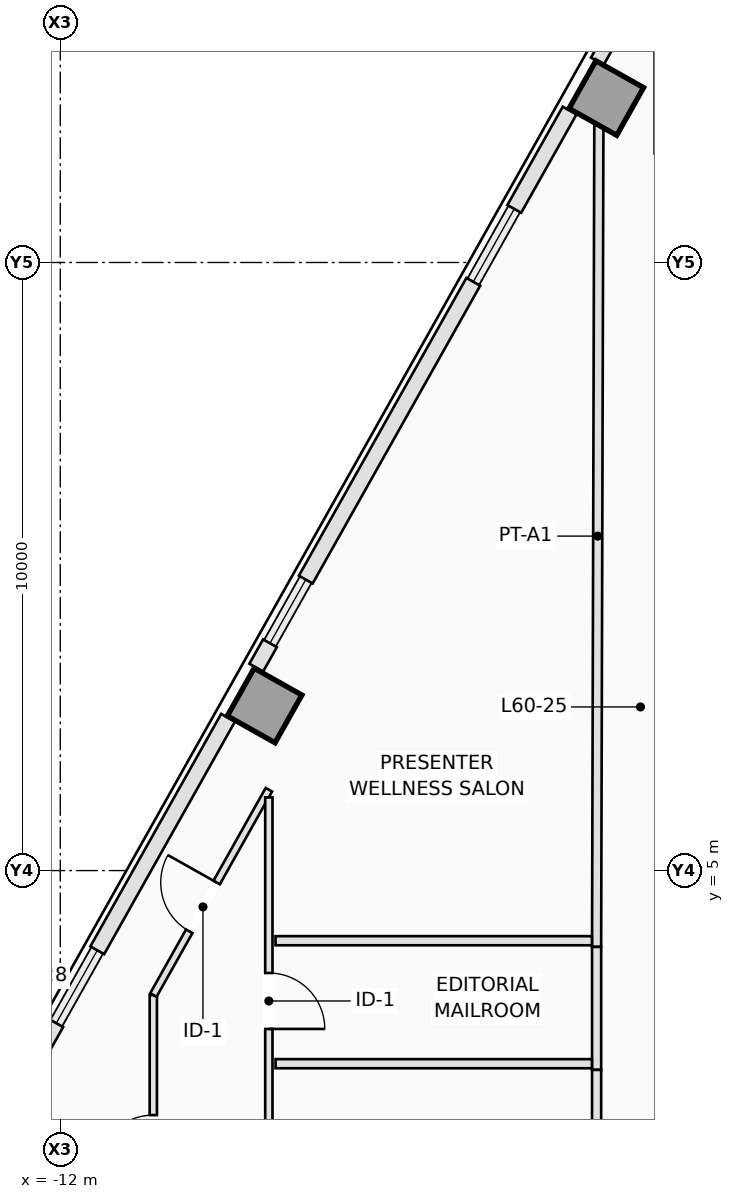
"""IFC4 building model, lengths in metres.
Left out: names, types, materials, properties, quantities, classifications, styles, units other than length and angle.
Written with IfcOpenShell. Run it as: python <this file> out.ifc"""

import sys

from ifc_helpers import new_model, si_unit, direction, frame, frame_2d, origin, origin_2d, place, context, subcontext, project, spatial, rectangle, extrude, element, fill, save


model = new_model("IFC4")
c1 = context("Model", 3, precision=1e-05, world=origin(), true_north=direction((0.0, 1.0)))
c2 = subcontext(c1, "Body", "Model", "MODEL_VIEW")
j1 = project(units=[si_unit("LENGTHUNIT", "METRE"), si_unit("PLANEANGLEUNIT", "RADIAN")], contexts=[c1])
p1 = place(None, origin())
s1 = spatial("IfcSite", under=j1, at=p1, CompositionType="ELEMENT")
p2 = place(p1, origin())
s2 = spatial("IfcBuilding", under=s1, at=p2, CompositionType="ELEMENT")
p3 = place(p2, frame((0.0, 0.0, 218.4)))
s3 = spatial("IfcBuildingStorey", under=s2, at=p3, CompositionType="ELEMENT", Elevation=218.4)
for number, where, z_axis, x_axis in (
    (1, (-3.021, 17.704, 0.0), (0.0, 0.0, 1.0), (-0.872, 0.49, 0.0)),
    (2, (-8.64, 7.715, 0.0), (0.0, 0.0, 1.0), (-0.872, 0.49, 0.0)),
):
    element("IfcColumn", number, at=place(p3, frame(where, z_axis=z_axis, x_axis=x_axis)), inside=s3, PredefinedType="COLUMN", context=c2, shape_type="SweptSolid", body=[
        extrude(rectangle(XDim=0.9, YDim=0.9, at=origin_2d()), origin(), (0.0, 0.0, 1.0), 3.5),
    ])
p4 = place(p3, frame((-3.168, 18.309, 0.0), z_axis=(0.0, 0.0, 1.0), x_axis=(0.490345412687, 0.87152818443, 0.0)))
e3 = element("IfcWall", 3, at=p4, inside=s3, PredefinedType="STANDARD", context=c2, shape_type="SweptSolid", body=[
    extrude(rectangle(XDim=0.964, YDim=0.24, at=frame_2d((0.482, 0.0))), origin(), (0.0, 0.0, 1.0), 3.25),
])
p5 = place(p3, frame((-8.777, 8.337, 0.0), z_axis=(0.0, 0.0, 1.0), x_axis=(0.490412424957, 0.871490478116, 0.0)))
e4 = element("IfcWall", 4, at=p5, inside=s3, PredefinedType="STANDARD", context=c2, shape_type="SweptSolid", body=[
    extrude(rectangle(XDim=0.46, YDim=0.26, at=frame_2d((0.23, 0.0))), origin(), (0.0, 0.0, 1.0), 3.25),
])
p6 = place(p3, frame((-7.962, 9.785, 0.0), z_axis=(0.0, 0.0, 1.0), x_axis=(0.490240608828, 0.871587141631, 0.0)))
e5 = element("IfcWall", 5, at=p6, inside=s3, PredefinedType="STANDARD", context=c2, shape_type="SweptSolid", body=[
    extrude(rectangle(XDim=5.618, YDim=0.26, at=frame_2d((2.809, 0.0))), origin(), (0.0, 0.0, 1.0), 3.25),
])
p7 = place(p3, frame((-4.533, 15.882, 0.0), z_axis=(0.0, 0.0, 1.0), x_axis=(0.490261239633, 0.871575537125, 0.0)))
e6 = element("IfcWall", 6, at=p7, inside=s3, PredefinedType="STANDARD", context=c2, shape_type="SweptSolid", body=[
    extrude(rectangle(XDim=1.855, YDim=0.26, at=frame_2d((0.928, 0.0))), origin(), (0.0, 0.0, 1.0), 3.25),
])
p8 = place(p3, frame((-14.217, -1.334, 0.0), z_axis=(0.0, 0.0, 1.0), x_axis=(0.490261239633, 0.871575537125, 0.0)))
e7 = element("IfcWall", 7, at=p8, inside=s3, PredefinedType="STANDARD", context=c2, shape_type="SweptSolid", body=[
    extrude(rectangle(XDim=4.388, YDim=0.26, at=frame_2d((2.194, 0.0))), origin(), (0.0, 0.0, 1.0), 3.25),
])
p9 = place(p3, frame((-11.392, 3.689, 0.0), z_axis=(0.0, 0.0, 1.0), x_axis=(0.490237464814, 0.871588910033, 0.0)))
e8 = element("IfcWall", 8, at=p9, inside=s3, PredefinedType="STANDARD", context=c2, shape_type="SweptSolid", body=[
    extrude(rectangle(XDim=4.388, YDim=0.26, at=frame_2d((2.194, 0.0))), origin(), (0.0, 0.0, 1.0), 3.25),
])
p10 = place(p3, frame((-2.106, 16.792, 0.0), z_axis=(0.0, 0.0, 1.0), x_axis=(0.0, 1.0, 0.0)))
e9 = element("IfcWall", 9, at=p10, inside=s3, PredefinedType="STANDARD", context=c2, shape_type="SweptSolid", body=[
    extrude(rectangle(XDim=2.36, YDim=0.24, at=frame_2d((1.18, 0.0))), origin(), (0.0, 0.0, 1.0), 3.25),
])
p11 = place(p3, frame((-10.47, -2.338, 0.0), z_axis=(0.0, 0.0, 1.0), x_axis=(0.0, 1.0, 0.0)))
e10 = element("IfcWall", 10, at=p11, inside=s3, PredefinedType="PARTITIONING", context=c2, shape_type="SweptSolid", body=[
    extrude(rectangle(XDim=5.289, YDim=0.12, at=frame_2d((2.645, 0.0))), origin(), (0.0, 0.0, 1.0), 3.25),
])
p12 = place(p11, frame((2.397, 0.0, 0.0)))
e11 = element("IfcOpeningElement", 11, at=p12, cuts=e10, PredefinedType="OPENING", context=c2, shape_type="SweptSolid", body=[
    extrude(rectangle(XDim=0.92, YDim=2.12, at=frame_2d((0.46, 1.06))), frame((0.0, 0.07, 0.0), z_axis=(0.0, -1.0, 0.0), x_axis=(1.0, 0.0, 0.0)), (0.0, 0.0, 1.0), 0.14),
])
p13 = place(p3, frame((-10.469, 2.953, 0.0), z_axis=(0.0, 0.0, 1.0), x_axis=(0.490276203052, 0.871567120032, 0.0)))
e12 = element("IfcWall", 12, at=p13, inside=s3, PredefinedType="PARTITIONING", context=c2, shape_type="SweptSolid", body=[
    extrude(rectangle(XDim=3.873, YDim=0.12, at=frame_2d((1.937, 0.0))), origin(), (0.0, 0.0, 1.0), 3.25),
])
p14 = place(p13, frame((1.203, 0.0, 0.0)))
e13 = element("IfcOpeningElement", 13, at=p14, cuts=e12, PredefinedType="OPENING", context=c2, shape_type="SweptSolid", body=[
    extrude(rectangle(XDim=0.92, YDim=2.12, at=frame_2d((0.46, 1.06))), frame((0.0, 0.07, 0.0), z_axis=(0.0, -1.0, 0.0), x_axis=(1.0, 0.0, 0.0)), (0.0, 0.0, 1.0), 0.14),
])
p15 = place(p3, frame((-8.57, 6.203, 0.0), z_axis=(0.0, 0.0, 1.0), x_axis=(0.0, -1.0, 0.0)))
e14 = element("IfcWall", 14, at=p15, inside=s3, PredefinedType="PARTITIONING", context=c2, shape_type="SweptSolid", body=[
    extrude(rectangle(XDim=8.603, YDim=0.12, at=frame_2d((4.301, 0.0))), origin(), (0.0, 0.0, 1.0), 3.25),
])
p16 = place(p15, frame((2.887, 0.0, 0.0)))
e15 = element("IfcOpeningElement", 15, at=p16, cuts=e14, PredefinedType="OPENING", context=c2, shape_type="SweptSolid", body=[
    extrude(rectangle(XDim=0.92, YDim=2.12, at=frame_2d((0.46, 1.06))), frame((0.0, 0.07, 0.0), z_axis=(0.0, -1.0, 0.0), x_axis=(1.0, 0.0, 0.0)), (0.0, 0.0, 1.0), 0.14),
])
p17 = place(p3, frame((-3.143, 17.254, 0.0), z_axis=(0.0, 0.0, 1.0), x_axis=(-0.002783390028, -0.999996126362, 0.0)))
e16 = element("IfcWall", 16, at=p17, inside=s3, PredefinedType="PARTITIONING", context=c2, shape_type="SweptSolid", body=[
    extrude(rectangle(XDim=13.508, YDim=0.15, at=frame_2d((6.754, 0.0))), origin(), (0.0, 0.0, 1.0), 2.722),
])
p18 = place(p3, frame((-3.257, 3.846, 0.0), z_axis=(0.0, 0.0, 1.0), x_axis=(-1.0, 0.0, 0.0)))
e17 = element("IfcWall", 17, at=p18, inside=s3, PredefinedType="PARTITIONING", context=c2, shape_type="SweptSolid", body=[
    extrude(rectangle(XDim=5.203, YDim=0.15, at=frame_2d((2.602, 0.0))), origin(), (0.0, 0.0, 1.0), 2.943),
])
p19 = place(p3, frame((-3.18, 1.724, 0.0), z_axis=(0.0, 0.0, 1.0), x_axis=(0.0, 1.0, 0.0)))
e18 = element("IfcWall", 18, at=p19, inside=s3, PredefinedType="PARTITIONING", context=c2, shape_type="SweptSolid", body=[
    extrude(rectangle(XDim=2.02, YDim=0.15, at=frame_2d((1.01, 0.0))), origin(), (0.0, 0.0, 1.0), 3.25),
])
p20 = place(p3, frame((-3.18, -2.29, 0.0), z_axis=(0.0, 0.0, 1.0), x_axis=(0.0, 1.0, 0.0)))
e19 = element("IfcWall", 19, at=p20, inside=s3, PredefinedType="PARTITIONING", context=c2, shape_type="SweptSolid", body=[
    extrude(rectangle(XDim=4.012, YDim=0.15, at=frame_2d((2.006, 0.0))), origin(), (0.0, 0.0, 1.0), 3.25),
])
p21 = place(p3, frame((-3.257, 1.824, 0.0), z_axis=(0.0, 0.0, 1.0), x_axis=(-1.0, 0.0, 0.0)))
e20 = element("IfcWall", 20, at=p21, inside=s3, PredefinedType="PARTITIONING", context=c2, shape_type="SweptSolid", body=[
    extrude(rectangle(XDim=5.203, YDim=0.15, at=frame_2d((2.602, 0.0))), origin(), (0.0, 0.0, 1.0), 3.25),
])
p22 = place(p14, origin())
e21 = element("IfcDoor", 21, at=p22, inside=s3, OperationType="SINGLE_SWING_RIGHT", PredefinedType="DOOR", context=c2, shape_type="SweptSolid", body=[
    extrude(rectangle(XDim=0.92, YDim=2.12, at=frame_2d((0.46, 1.06))), frame((0.0, 0.025, 0.0), z_axis=(0.0, -1.0, 0.0), x_axis=(1.0, 0.0, 0.0)), (0.0, 0.0, 1.0), 0.05),
])
fill(e13, e21)
p23 = place(p16, origin())
e22 = element("IfcDoor", 22, at=p23, inside=s3, OperationType="SINGLE_SWING_RIGHT", PredefinedType="DOOR", context=c2, shape_type="SweptSolid", body=[
    extrude(rectangle(XDim=0.92, YDim=2.12, at=frame_2d((0.46, 1.06))), frame((0.0, 0.025, 0.0), z_axis=(0.0, -1.0, 0.0), x_axis=(1.0, 0.0, 0.0)), (0.0, 0.0, 1.0), 0.05),
])
fill(e15, e22)
p24 = place(p12, origin())
e23 = element("IfcDoor", 23, at=p24, inside=s3, OperationType="SINGLE_SWING_LEFT", PredefinedType="DOOR", context=c2, shape_type="SweptSolid", body=[
    extrude(rectangle(XDim=0.92, YDim=2.12, at=frame_2d((0.46, 1.06))), frame((0.0, 0.025, 0.0), z_axis=(0.0, -1.0, 0.0), x_axis=(1.0, 0.0, 0.0)), (0.0, 0.0, 1.0), 0.05),
])
fill(e11, e23)
save(model, sys.argv[1])
